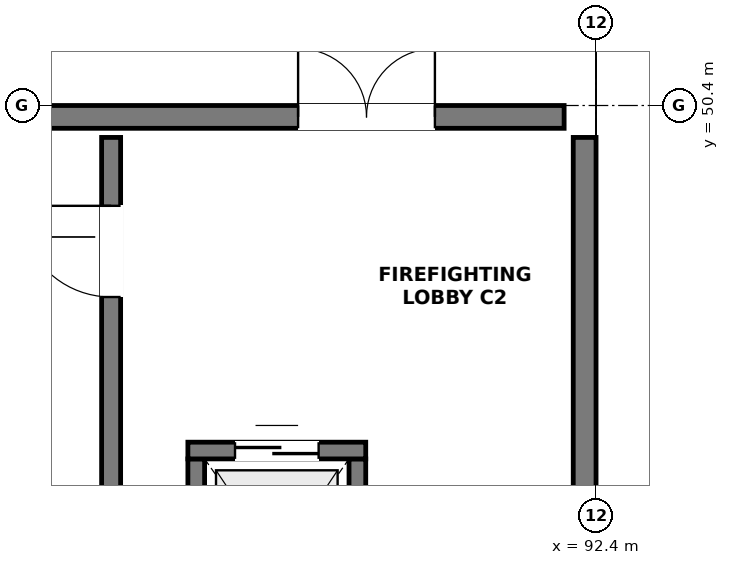
"""IFC4 building model, lengths in metres.
Left out: names, types, materials, properties, quantities, classifications, styles, units other than length and angle.
Written with IfcOpenShell. Run it as: python <this file> out.ifc"""

import sys

from ifc_helpers import new_model, si_unit, direction, frame, frame_2d, origin, place, context, subcontext, project, spatial, rectangle, extrude, element, fill, save


model = new_model("IFC4")
c1 = context("Model", 3, precision=1e-05, world=origin(), true_north=direction((0.0, 1.0)))
c2 = subcontext(c1, "Body", "Model", "MODEL_VIEW")
j1 = project(units=[si_unit("LENGTHUNIT", "METRE"), si_unit("PLANEANGLEUNIT", "RADIAN")], contexts=[c1])
p1 = place(None, origin())
s1 = spatial("IfcSite", under=j1, at=p1, CompositionType="ELEMENT")
p2 = place(p1, origin())
s2 = spatial("IfcBuilding", under=s1, at=p2, CompositionType="ELEMENT")
p3 = place(p2, frame((0.0, 0.0, 21.6)))
s3 = spatial("IfcBuildingStorey", under=s2, at=p3, CompositionType="ELEMENT", Elevation=21.6)
p4 = place(p3, frame((76.02, 50.25, 0.0), z_axis=(0.0, 0.0, 1.0), x_axis=(1.0, 0.0, 0.0)))
e1 = element("IfcWall", 1, at=p4, inside=s3, PredefinedType="SHEAR", context=c2, shape_type="SweptSolid", body=[
    extrude(rectangle(XDim=15.96, YDim=0.3, at=frame_2d((7.98, 0.0))), origin(), (0.0, 0.0, 1.0), 3.64),
])
p5 = place(p4, frame((12.46, 0.0, 0.0)))
e2 = element("IfcOpeningElement", 2, at=p5, cuts=e1, PredefinedType="OPENING", context=c2, shape_type="SweptSolid", body=[
    extrude(rectangle(XDim=1.8, YDim=2.2, at=frame_2d((0.9, 1.1))), frame((0.0, 0.162, 0.0), z_axis=(0.0, -1.0, 0.0), x_axis=(1.0, 0.0, 0.0)), (0.0, 0.0, 1.0), 0.324),
])
p6 = place(p3, frame((92.25, 42.42, 0.0), z_axis=(0.0, 0.0, 1.0), x_axis=(0.0, 1.0, 0.0)))
e3 = element("IfcWall", 3, at=p6, inside=s3, PredefinedType="SHEAR", context=c2, shape_type="SweptSolid", body=[
    extrude(rectangle(XDim=7.56, YDim=0.3, at=frame_2d((3.78, 0.0))), origin(), (0.0, 0.0, 1.0), 3.64),
])
p7 = place(p3, frame((86.02, 42.42, 0.0), z_axis=(0.0, 0.0, 1.0), x_axis=(0.0, 1.0, 0.0)))
e4 = element("IfcWall", 4, at=p7, inside=s3, PredefinedType="SHEAR", context=c2, shape_type="SweptSolid", body=[
    extrude(rectangle(XDim=7.56, YDim=0.25, at=frame_2d((3.78, 0.0))), origin(), (0.0, 0.0, 1.0), 3.64),
])
p8 = place(p7, frame((5.46, 0.0, 0.0)))
e5 = element("IfcOpeningElement", 5, at=p8, cuts=e4, PredefinedType="OPENING", context=c2, shape_type="SweptSolid", body=[
    extrude(rectangle(XDim=1.2, YDim=2.2, at=frame_2d((0.6, 1.1))), frame((0.0, 0.137, 0.0), z_axis=(0.0, -1.0, 0.0), x_axis=(1.0, 0.0, 0.0)), (0.0, 0.0, 1.0), 0.274),
])
for number, where, z_axis, x_axis in (
    (6, (87.14, 43.05, 0.0), (0.0, 0.0, 1.0), (0.0, 1.0, 0.0)),
    (7, (89.26, 43.05, 0.0), (0.0, 0.0, 1.0), (0.0, 1.0, 0.0)),
):
    element("IfcWall", number, at=place(p3, frame(where, z_axis=z_axis, x_axis=x_axis)), inside=s3, PredefinedType="SOLIDWALL", context=c2, shape_type="SweptSolid", body=[
        extrude(rectangle(XDim=2.7, YDim=0.22, at=frame_2d((1.35, 0.0))), origin(), (0.0, 0.0, 1.0), 3.64),
    ])
p9 = place(p3, frame((87.03, 45.86, 0.0), z_axis=(0.0, 0.0, 1.0), x_axis=(1.0, 0.0, 0.0)))
e8 = element("IfcWall", 8, at=p9, inside=s3, PredefinedType="SOLIDWALL", context=c2, shape_type="SweptSolid", body=[
    extrude(rectangle(XDim=2.34, YDim=0.22, at=frame_2d((1.17, 0.0))), origin(), (0.0, 0.0, 1.0), 3.64),
])
p10 = place(p9, frame((0.62, 0.0, 0.0)))
e9 = element("IfcOpeningElement", 9, at=p10, cuts=e8, PredefinedType="OPENING", context=c2, shape_type="SweptSolid", body=[
    extrude(rectangle(XDim=1.1, YDim=2.15, at=frame_2d((0.55, 1.075))), frame((0.0, 0.122, 0.0), z_axis=(0.0, -1.0, 0.0), x_axis=(1.0, 0.0, 0.0)), (0.0, 0.0, 1.0), 0.244),
])
p11 = place(p5, origin())
e10 = element("IfcDoor", 10, at=p11, inside=s3, OperationType="DOUBLE_DOOR_SINGLE_SWING", PredefinedType="DOOR", context=c2, shape_type="SweptSolid", body=[
    extrude(rectangle(XDim=1.8, YDim=2.2, at=frame_2d((0.9, 1.1))), frame((0.0, 0.025, 0.0), z_axis=(0.0, -1.0, 0.0), x_axis=(1.0, 0.0, 0.0)), (0.0, 0.0, 1.0), 0.05),
])
fill(e2, e10)
p12 = place(p8, origin())
e11 = element("IfcDoor", 11, at=p12, inside=s3, OperationType="SINGLE_SWING_RIGHT", PredefinedType="DOOR", context=c2, shape_type="SweptSolid", body=[
    extrude(rectangle(XDim=1.2, YDim=2.2, at=frame_2d((0.6, 1.1))), frame((0.0, 0.025, 0.0), z_axis=(0.0, -1.0, 0.0), x_axis=(1.0, 0.0, 0.0)), (0.0, 0.0, 1.0), 0.05),
])
fill(e5, e11)
p13 = place(p10, origin())
e12 = element("IfcDoor", 12, at=p13, inside=s3, OperationType="DOUBLE_DOOR_SLIDING", PredefinedType="DOOR", context=c2, shape_type="SweptSolid", body=[
    extrude(rectangle(XDim=1.1, YDim=2.15, at=frame_2d((0.55, 1.075))), frame((0.0, 0.025, 0.0), z_axis=(0.0, -1.0, 0.0), x_axis=(1.0, 0.0, 0.0)), (0.0, 0.0, 1.0), 0.05),
])
fill(e9, e12)
save(model, sys.argv[1])
